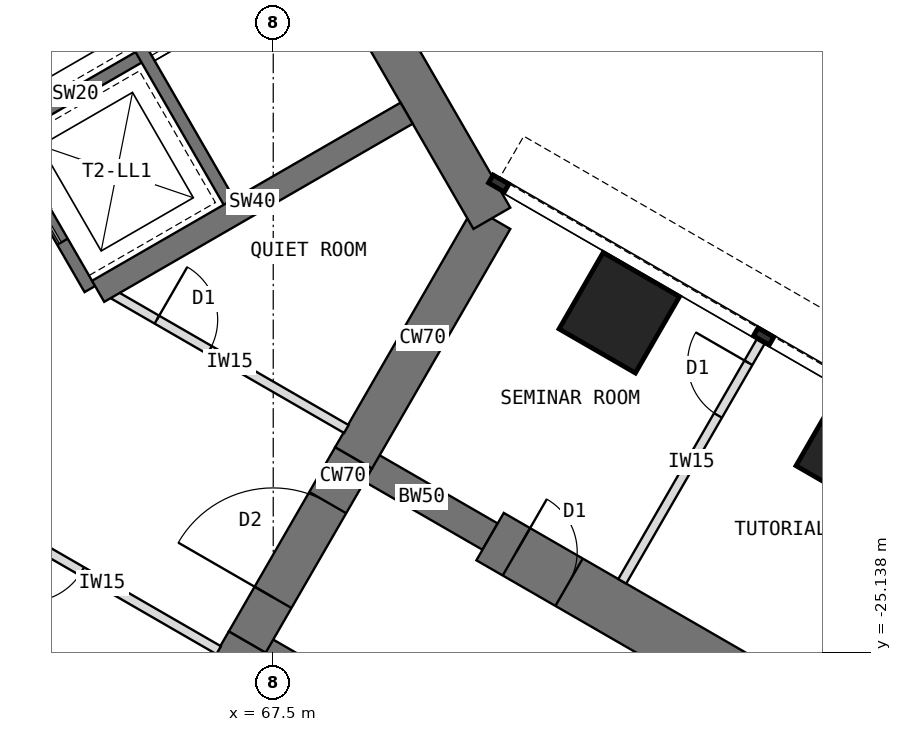
"""IFC4 building model, lengths in metres.
Left out: names, types, materials, properties, quantities, classifications, styles, units other than length and angle.
Written with IfcOpenShell. Run it as: python <this file> out.ifc"""

import sys

from ifc_helpers import new_model, si_unit, direction, frame, frame_2d, origin, origin_2d, place, context, subcontext, project, spatial, rectangle, extrude, element, fill, save


model = new_model("IFC4")
c1 = context("Model", 3, precision=1e-05, world=origin(), true_north=direction((0.0, 1.0)))
c2 = subcontext(c1, "Body", "Model", "MODEL_VIEW")
j1 = project(units=[si_unit("LENGTHUNIT", "METRE"), si_unit("PLANEANGLEUNIT", "RADIAN")], contexts=[c1])
p1 = place(None, origin())
s1 = spatial("IfcSite", under=j1, at=p1, CompositionType="ELEMENT")
p2 = place(p1, origin())
s2 = spatial("IfcBuilding", under=s1, at=p2, CompositionType="ELEMENT")
p3 = place(p2, frame((0.0, 0.0, 68.5)))
s3 = spatial("IfcBuildingStorey", under=s2, at=p3, CompositionType="ELEMENT", Elevation=68.5)
p4 = place(p3, frame((64.798, -28.908, 0.0), z_axis=(0.0, 0.0, 1.0), x_axis=(0.499984222037, 0.866034513004, 0.0)))
e1 = element("IfcWall", 1, at=p4, inside=s3, PredefinedType="SHEAR", context=c2, shape_type="SweptSolid", body=[
    extrude(rectangle(XDim=4.548, YDim=0.7, at=frame_2d((2.274, 0.0))), origin(), (0.0, 0.0, 1.0), 4.0),
])
p5 = place(p3, frame((67.072, -24.97, 0.0), z_axis=(0.0, 0.0, 1.0), x_axis=(0.500010275428, 0.866019471182, 0.0)))
e2 = element("IfcWall", 2, at=p5, inside=s3, PredefinedType="SHEAR", context=c2, shape_type="SweptSolid", body=[
    extrude(rectangle(XDim=3.5, YDim=0.7, at=frame_2d((1.75, 0.0))), origin(), (0.0, 0.0, 1.0), 4.0),
])
p6 = place(p5, frame((0.85, 0.0, 0.0)))
e3 = element("IfcOpeningElement", 3, at=p6, cuts=e2, PredefinedType="OPENING", context=c2, shape_type="SweptSolid", body=[
    extrude(rectangle(XDim=1.8, YDim=2.1, at=frame_2d((0.9, 1.05))), frame((0.0, 0.36, 0.0), z_axis=(0.0, -1.0, 0.0), x_axis=(1.0, 0.0, 0.0)), (0.0, 0.0, 1.0), 0.72),
])
p7 = place(p3, frame((68.822, -21.939, 0.0), z_axis=(0.0, 0.0, 1.0), x_axis=(0.500024481964, 0.866011268655, 0.0)))
e4 = element("IfcWall", 4, at=p7, inside=s3, PredefinedType="SHEAR", context=c2, shape_type="SweptSolid", body=[
    extrude(rectangle(XDim=4.548, YDim=0.7, at=frame_2d((2.274, 0.0))), origin(), (0.0, 0.0, 1.0), 4.0),
])
p8 = place(p3, frame((71.096, -18.0, 0.0), z_axis=(0.0, 0.0, 1.0), x_axis=(-0.500005998175, 0.866021940709, 0.0)))
e5 = element("IfcWall", 5, at=p8, inside=s3, PredefinedType="SHEAR", context=c2, shape_type="SweptSolid", body=[
    extrude(rectangle(XDim=12.596, YDim=0.7, at=frame_2d((6.298, 0.0))), origin(), (0.0, 0.0, 1.0), 4.0),
])
p9 = place(p3, frame((68.822, -21.939, 0.0), z_axis=(0.0, 0.0, 1.0), x_axis=(0.866072649678, -0.499918158782, 0.0)))
e6 = element("IfcWall", 6, at=p9, inside=s3, PredefinedType="SHEAR", context=c2, shape_type="SweptSolid", body=[
    extrude(rectangle(XDim=2.592, YDim=0.5, at=frame_2d((1.296, 0.0))), origin(), (0.0, 0.0, 1.0), 4.0),
])
p10 = place(p3, frame((71.066, -23.234, 0.0), z_axis=(0.0, 0.0, 1.0), x_axis=(0.86602681393, -0.499997557548, 0.0)))
e7 = element("IfcWall", 7, at=p10, inside=s3, PredefinedType="SHEAR", context=c2, shape_type="SweptSolid", body=[
    extrude(rectangle(XDim=9.5, YDim=0.9, at=frame_2d((4.75, 0.0))), origin(), (0.0, 0.0, 1.0), 4.0),
])
p11 = place(p10, frame((0.5, 0.0, 0.0)))
e8 = element("IfcOpeningElement", 8, at=p11, cuts=e7, PredefinedType="OPENING", context=c2, shape_type="SweptSolid", body=[
    extrude(rectangle(XDim=1.0, YDim=2.1, at=frame_2d((0.5, 1.05))), frame((0.0, 0.46, 0.0), z_axis=(0.0, -1.0, 0.0), x_axis=(1.0, 0.0, 0.0)), (0.0, 0.0, 1.0), 0.92),
])
p12 = place(p10, frame((7.25, 0.0, 0.0)))
e9 = element("IfcOpeningElement", 9, at=p12, cuts=e7, PredefinedType="OPENING", context=c2, shape_type="SweptSolid", body=[
    extrude(rectangle(XDim=1.0, YDim=2.1, at=frame_2d((0.5, 1.05))), frame((0.0, 0.46, 0.0), z_axis=(0.0, -1.0, 0.0), x_axis=(1.0, 0.0, 0.0)), (0.0, 0.0, 1.0), 0.92),
])
p13 = place(p3, frame((67.072, -24.97, 0.0), z_axis=(0.0, 0.0, 1.0), x_axis=(0.866031863473, -0.499988811324, 0.0)))
e10 = element("IfcWall", 10, at=p13, inside=s3, PredefinedType="SHEAR", context=c2, shape_type="SweptSolid", body=[
    extrude(rectangle(XDim=2.592, YDim=0.5, at=frame_2d((1.296, 0.0))), origin(), (0.0, 0.0, 1.0), 4.0),
])
for number, where, z_axis, x_axis in (
    (11, (73.191, -19.554, 0.0), (0.0, 0.0, 1.0), (0.5, 0.866, 0.0)),
    (12, (77.088, -21.804, 0.0), (0.0, 0.0, 1.0), (0.5, 0.866, 0.0)),
):
    element("IfcColumn", number, at=place(p3, frame(where, z_axis=z_axis, x_axis=x_axis)), inside=s3, PredefinedType="COLUMN", context=c2, shape_type="SweptSolid", body=[
        extrude(rectangle(XDim=1.45, YDim=1.45, at=origin_2d()), origin(), (0.0, 0.0, 1.0), 4.0),
    ])
p14 = place(p3, frame((64.484, -19.164, 0.0), z_axis=(0.0, 0.0, 1.0), x_axis=(-0.49999894854, 0.866026010844, 0.0)))
e13 = element("IfcWall", 13, at=p14, inside=s3, PredefinedType="SHEAR", context=c2, shape_type="SweptSolid", body=[
    extrude(rectangle(XDim=8.0, YDim=0.2, at=frame_2d((4.0, 0.0))), origin(), (0.0, 0.0, 1.0), 4.0),
])
p15 = place(p14, frame((6.3, 0.0, 0.0)))
e14 = element("IfcOpeningElement", 14, at=p15, cuts=e13, PredefinedType="OPENING", context=c2, shape_type="SweptSolid", body=[
    extrude(rectangle(XDim=1.2, YDim=2.1, at=frame_2d((0.6, 1.05))), frame((0.0, 0.11, 0.0), z_axis=(0.0, -1.0, 0.0), x_axis=(1.0, 0.0, 0.0)), (0.0, 0.0, 1.0), 0.22),
])
p16 = place(p14, frame((0.9, 0.0, 0.0)))
e15 = element("IfcOpeningElement", 15, at=p16, cuts=e13, PredefinedType="OPENING", context=c2, shape_type="SweptSolid", body=[
    extrude(rectangle(XDim=1.1, YDim=2.2, at=frame_2d((0.55, 1.1))), frame((0.0, 0.11, 0.0), z_axis=(0.0, -1.0, 0.0), x_axis=(1.0, 0.0, 0.0)), (0.0, 0.0, 1.0), 0.22),
])
p17 = place(p14, frame((3.8, 0.0, 0.0)))
e16 = element("IfcOpeningElement", 16, at=p17, cuts=e13, PredefinedType="OPENING", context=c2, shape_type="SweptSolid", body=[
    extrude(rectangle(XDim=1.1, YDim=2.2, at=frame_2d((0.55, 1.1))), frame((0.0, 0.11, 0.0), z_axis=(0.0, -1.0, 0.0), x_axis=(1.0, 0.0, 0.0)), (0.0, 0.0, 1.0), 0.22),
])
p18 = place(p3, frame((63.12, -16.603, 0.0), z_axis=(0.0, 0.0, 1.0), x_axis=(0.866062058628, 0.499936506574, 0.0)))
e17 = element("IfcWall", 17, at=p18, inside=s3, PredefinedType="SHEAR", context=c2, shape_type="SweptSolid", body=[
    extrude(rectangle(XDim=2.6, YDim=0.2, at=frame_2d((1.3, 0.0))), origin(), (0.0, 0.0, 1.0), 4.0),
])
p19 = place(p3, frame((66.822, -17.814, 0.0), z_axis=(0.0, 0.0, 1.0), x_axis=(-0.49999894854, 0.866026010844, 0.0)))
e18 = element("IfcWall", 18, at=p19, inside=s3, PredefinedType="SHEAR", context=c2, shape_type="SweptSolid", body=[
    extrude(rectangle(XDim=8.0, YDim=0.2, at=frame_2d((4.0, 0.0))), origin(), (0.0, 0.0, 1.0), 4.0),
])
p20 = place(p19, frame((6.7, 0.0, 0.0)))
e19 = element("IfcOpeningElement", 19, at=p20, cuts=e18, PredefinedType="OPENING", context=c2, shape_type="SweptSolid", body=[
    extrude(rectangle(XDim=1.1, YDim=2.1, at=frame_2d((0.55, 1.05))), frame((0.0, 0.11, 0.0), z_axis=(0.0, -1.0, 0.0), x_axis=(1.0, 0.0, 0.0)), (0.0, 0.0, 1.0), 0.22),
])
p21 = place(p3, frame((64.62, -19.201, 0.0), z_axis=(0.0, 0.0, 1.0), x_axis=(0.866023886965, 0.500002627198, 0.0)))
e20 = element("IfcWall", 20, at=p21, inside=s3, PredefinedType="SHEAR", context=c2, shape_type="SweptSolid", body=[
    extrude(rectangle(XDim=5.858, YDim=0.4, at=frame_2d((2.929, 0.0))), origin(), (0.0, 0.0, 1.0), 4.0),
])
p22 = place(p3, frame((73.24, -23.97, 0.0), z_axis=(0.0, 0.0, 1.0), x_axis=(0.499982560684, 0.866035472144, 0.0)))
e21 = element("IfcWall", 21, at=p22, inside=s3, PredefinedType="PARTITIONING", context=c2, shape_type="SweptSolid", body=[
    extrude(rectangle(XDim=4.55, YDim=0.15, at=frame_2d((2.275, 0.0))), origin(), (0.0, 0.0, 1.0), 3.8),
])
p23 = place(p22, frame((3.15, 0.0, 0.0)))
e22 = element("IfcOpeningElement", 22, at=p23, cuts=e21, PredefinedType="OPENING", context=c2, shape_type="SweptSolid", body=[
    extrude(rectangle(XDim=1.0, YDim=2.1, at=frame_2d((0.5, 1.05))), frame((0.0, 0.085, 0.0), z_axis=(0.0, -1.0, 0.0), x_axis=(1.0, 0.0, 0.0)), (0.0, 0.0, 1.0), 0.17),
])
p24 = place(p3, frame((64.87, -19.253, 0.0), z_axis=(0.0, 0.0, 1.0), x_axis=(0.866021148949, -0.500007369519, 0.0)))
e23 = element("IfcWall", 23, at=p24, inside=s3, PredefinedType="PARTITIONING", context=c2, shape_type="SweptSolid", body=[
    extrude(rectangle(XDim=4.426, YDim=0.15, at=frame_2d((2.213, 0.0))), origin(), (0.0, 0.0, 1.0), 3.8),
])
p25 = place(p24, frame((0.828, 0.0, 0.0)))
e24 = element("IfcOpeningElement", 24, at=p25, cuts=e23, PredefinedType="OPENING", context=c2, shape_type="SweptSolid", body=[
    extrude(rectangle(XDim=1.0, YDim=2.1, at=frame_2d((0.5, 1.05))), frame((0.0, 0.085, 0.0), z_axis=(0.0, -1.0, 0.0), x_axis=(1.0, 0.0, 0.0)), (0.0, 0.0, 1.0), 0.17),
])
p26 = place(p3, frame((66.603, -25.103, 0.0), z_axis=(0.0, 0.0, 1.0), x_axis=(-0.866021148949, 0.500007369519, 0.0)))
e25 = element("IfcWall", 25, at=p26, inside=s3, PredefinedType="PARTITIONING", context=c2, shape_type="SweptSolid", body=[
    extrude(rectangle(XDim=4.426, YDim=0.15, at=frame_2d((2.213, 0.0))), origin(), (0.0, 0.0, 1.0), 3.8),
])
p27 = place(p26, frame((2.598, 0.0, 0.0)))
e26 = element("IfcOpeningElement", 26, at=p27, cuts=e25, PredefinedType="OPENING", context=c2, shape_type="SweptSolid", body=[
    extrude(rectangle(XDim=1.0, YDim=2.1, at=frame_2d((0.5, 1.05))), frame((0.0, 0.085, 0.0), z_axis=(0.0, -1.0, 0.0), x_axis=(1.0, 0.0, 0.0)), (0.0, 0.0, 1.0), 0.17),
])
p28 = place(p16, origin())
e27 = element("IfcDoor", 27, at=p28, inside=s3, OperationType="DOUBLE_DOOR_SLIDING", PredefinedType="DOOR", context=c2, shape_type="SweptSolid", body=[
    extrude(rectangle(XDim=1.1, YDim=2.2, at=frame_2d((0.55, 1.1))), frame((0.0, 0.025, 0.0), z_axis=(0.0, -1.0, 0.0), x_axis=(1.0, 0.0, 0.0)), (0.0, 0.0, 1.0), 0.05),
])
fill(e15, e27)
p29 = place(p6, origin())
e28 = element("IfcDoor", 28, at=p29, inside=s3, OperationType="DOUBLE_DOOR_DOUBLE_SWING", PredefinedType="DOOR", context=c2, shape_type="SweptSolid", body=[
    extrude(rectangle(XDim=1.72, YDim=2.06, at=frame_2d((0.9, 1.03))), frame((0.0, 0.025, 0.0), z_axis=(0.0, -1.0, 0.0), x_axis=(1.0, 0.0, 0.0)), (0.0, 0.0, 1.0), 0.05),
    extrude(rectangle(XDim=0.04, YDim=2.1, at=frame_2d((0.02, 1.05))), frame((0.0, 0.35, 0.0), z_axis=(0.0, -1.0, 0.0), x_axis=(1.0, 0.0, 0.0)), (0.0, 0.0, 1.0), 0.699),
    extrude(rectangle(XDim=0.04, YDim=2.1, at=frame_2d((1.78, 1.05))), frame((0.0, 0.35, 0.0), z_axis=(0.0, -1.0, 0.0), x_axis=(1.0, 0.0, 0.0)), (0.0, 0.0, 1.0), 0.699),
    extrude(rectangle(XDim=1.72, YDim=0.04, at=frame_2d((0.9, 2.08))), frame((0.0, 0.35, 0.0), z_axis=(0.0, -1.0, 0.0), x_axis=(1.0, 0.0, 0.0)), (0.0, 0.0, 1.0), 0.699),
])
fill(e3, e28)
p30 = place(p23, origin())
e29 = element("IfcDoor", 29, at=p30, inside=s3, OperationType="SINGLE_SWING_RIGHT", PredefinedType="DOOR", context=c2, shape_type="SweptSolid", body=[
    extrude(rectangle(XDim=1.0, YDim=2.1, at=frame_2d((0.5, 1.05))), frame((0.0, 0.025, 0.0), z_axis=(0.0, -1.0, 0.0), x_axis=(1.0, 0.0, 0.0)), (0.0, 0.0, 1.0), 0.05),
])
fill(e22, e29)
p31 = place(p27, origin())
e30 = element("IfcDoor", 30, at=p31, inside=s3, OperationType="SINGLE_SWING_RIGHT", PredefinedType="DOOR", context=c2, shape_type="SweptSolid", body=[
    extrude(rectangle(XDim=1.0, YDim=2.1, at=frame_2d((0.5, 1.05))), frame((0.0, 0.025, 0.0), z_axis=(0.0, -1.0, 0.0), x_axis=(1.0, 0.0, 0.0)), (0.0, 0.0, 1.0), 0.05),
])
fill(e26, e30)
p32 = place(p25, origin())
e31 = element("IfcDoor", 31, at=p32, inside=s3, OperationType="SINGLE_SWING_LEFT", PredefinedType="DOOR", context=c2, shape_type="SweptSolid", body=[
    extrude(rectangle(XDim=1.0, YDim=2.1, at=frame_2d((0.5, 1.05))), frame((0.0, 0.025, 0.0), z_axis=(0.0, -1.0, 0.0), x_axis=(1.0, 0.0, 0.0)), (0.0, 0.0, 1.0), 0.05),
])
fill(e24, e31)
p33 = place(p11, origin())
e32 = element("IfcDoor", 32, at=p33, inside=s3, OperationType="SINGLE_SWING_LEFT", PredefinedType="DOOR", context=c2, shape_type="SweptSolid", body=[
    extrude(rectangle(XDim=0.92, YDim=2.06, at=frame_2d((0.5, 1.03))), frame((0.0, 0.025, 0.0), z_axis=(0.0, -1.0, 0.0), x_axis=(1.0, 0.0, 0.0)), (0.0, 0.0, 1.0), 0.05),
    extrude(rectangle(XDim=0.04, YDim=2.1, at=frame_2d((0.02, 1.05))), frame((0.0, 0.45, 0.0), z_axis=(0.0, -1.0, 0.0), x_axis=(1.0, 0.0, 0.0)), (0.0, 0.0, 1.0), 0.899),
    extrude(rectangle(XDim=0.04, YDim=2.1, at=frame_2d((0.98, 1.05))), frame((0.0, 0.45, 0.0), z_axis=(0.0, -1.0, 0.0), x_axis=(1.0, 0.0, 0.0)), (0.0, 0.0, 1.0), 0.899),
    extrude(rectangle(XDim=0.92, YDim=0.04, at=frame_2d((0.5, 2.08))), frame((0.0, 0.45, 0.0), z_axis=(0.0, -1.0, 0.0), x_axis=(1.0, 0.0, 0.0)), (0.0, 0.0, 1.0), 0.899),
])
fill(e8, e32)
save(model, sys.argv[1])
